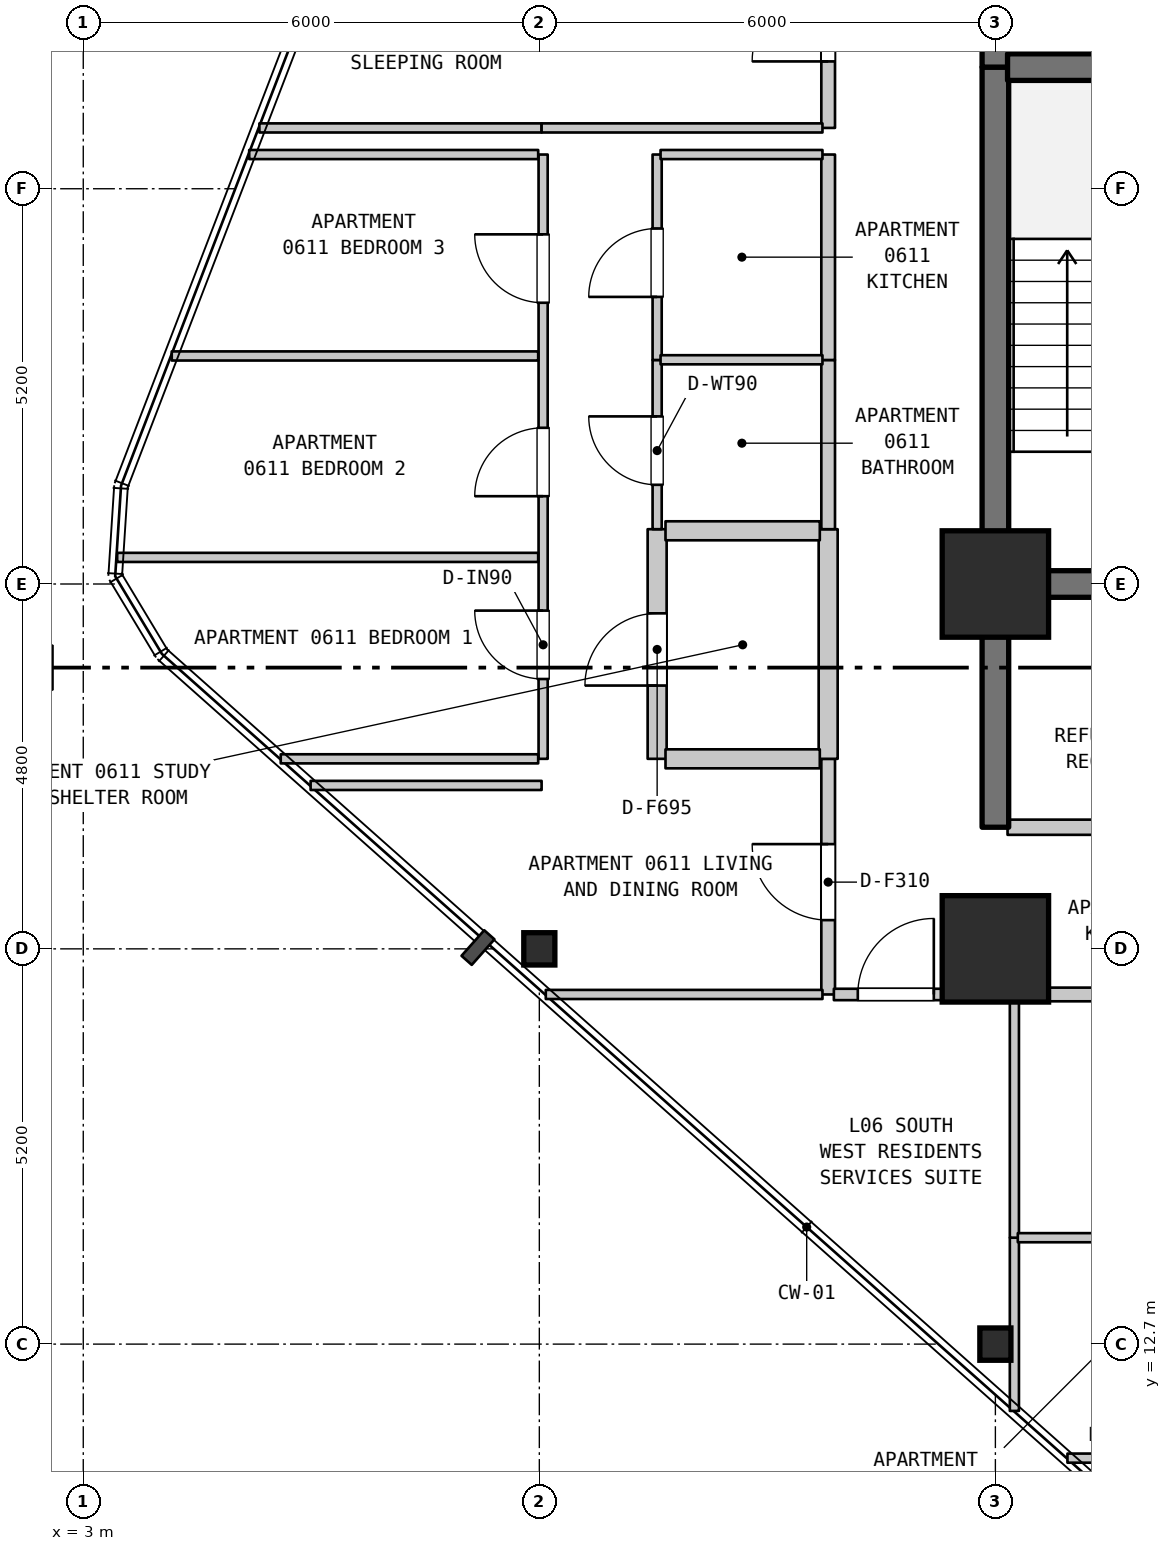
"""IFC4 building model, lengths in metres.
Left out: names, types, materials, properties, quantities, classifications, styles, units other than length and angle.
Written with IfcOpenShell. Run it as: python <this file> out.ifc"""

import sys

from ifc_helpers import new_model, si_unit, direction, frame, frame_2d, origin, origin_2d, place, context, subcontext, project, spatial, rectangle, i_section, extrude, element, fill, save


model = new_model("IFC4")
c1 = context("Model", 3, precision=1e-05, world=origin(), true_north=direction((0.0, 1.0)))
c2 = subcontext(c1, "Body", "Model", "MODEL_VIEW")
j1 = project(units=[si_unit("LENGTHUNIT", "METRE"), si_unit("PLANEANGLEUNIT", "RADIAN")], contexts=[c1])
p1 = place(None, origin())
s1 = spatial("IfcSite", under=j1, at=p1, CompositionType="ELEMENT")
p2 = place(p1, origin())
s2 = spatial("IfcBuilding", under=s1, at=p2, CompositionType="ELEMENT")
p3 = place(p2, frame((0.0, 0.0, 31.4)))
s3 = spatial("IfcBuildingStorey", under=s2, at=p3, CompositionType="ELEMENT", Elevation=31.4)
for number, where, z_axis, x_axis in (
    (1, (9.0, 17.9, 0.0), (0.0, 0.0, 1.0), (1.0, 0.0, 0.0)),
    (2, (15.0, 12.7, 0.0), (0.0, 0.0, 1.0), (1.0, 0.0, 0.0)),
):
    element("IfcColumn", number, at=place(p3, frame(where, z_axis=z_axis, x_axis=x_axis)), inside=s3, PredefinedType="COLUMN", context=c2, shape_type="SweptSolid", body=[
        extrude(i_section(OverallWidth=0.409, OverallDepth=0.425, WebThickness=0.032, FlangeThickness=0.052, FilletRadius=0.015, at=origin_2d()), origin(), (0.0, 0.0, 1.0), 3.7),
    ])
for number, where, z_axis, x_axis in (
    (3, (15.0, 17.9, 0.0), (0.0, 0.0, 1.0), (1.0, 0.0, 0.0)),
    (4, (15.0, 22.7, 0.0), (0.0, 0.0, 1.0), (1.0, 0.0, 0.0)),
):
    element("IfcColumn", number, at=place(p3, frame(where, z_axis=z_axis, x_axis=x_axis)), inside=s3, PredefinedType="COLUMN", context=c2, shape_type="SweptSolid", body=[
        extrude(rectangle(XDim=1.4, YDim=1.4, at=origin_2d()), origin(), (0.0, 0.0, 1.0), 3.7),
    ])
p4 = place(p3, frame((9.05, 20.4, 0.0), z_axis=(0.0, 0.0, 1.0), x_axis=(0.0, 1.0, 0.0)))
e5 = element("IfcWall", 5, at=p4, inside=s3, PredefinedType="PARTITIONING", context=c2, shape_type="SweptSolid", body=[
    extrude(rectangle(XDim=7.95, YDim=0.12, at=frame_2d((3.975, 0.0))), origin(), (0.0, 0.0, 1.0), 2.785),
])
p5 = place(p4, frame((1.05, 0.0, 0.0)))
e6 = element("IfcOpeningElement", 6, at=p5, cuts=e5, PredefinedType="OPENING", context=c2, shape_type="SweptSolid", body=[
    extrude(rectangle(XDim=0.9, YDim=2.15, at=frame_2d((0.45, 1.075))), frame((0.0, 0.07, 0.0), z_axis=(0.0, -1.0, 0.0), x_axis=(1.0, 0.0, 0.0)), (0.0, 0.0, 1.0), 0.14),
])
p6 = place(p4, frame((3.455, 0.0, 0.0)))
e7 = element("IfcOpeningElement", 7, at=p6, cuts=e5, PredefinedType="OPENING", context=c2, shape_type="SweptSolid", body=[
    extrude(rectangle(XDim=0.9, YDim=2.15, at=frame_2d((0.45, 1.075))), frame((0.0, 0.07, 0.0), z_axis=(0.0, -1.0, 0.0), x_axis=(1.0, 0.0, 0.0)), (0.0, 0.0, 1.0), 0.14),
])
p7 = place(p4, frame((6.0, 0.0, 0.0)))
e8 = element("IfcOpeningElement", 8, at=p7, cuts=e5, PredefinedType="OPENING", context=c2, shape_type="SweptSolid", body=[
    extrude(rectangle(XDim=0.9, YDim=2.15, at=frame_2d((0.45, 1.075))), frame((0.0, 0.07, 0.0), z_axis=(0.0, -1.0, 0.0), x_axis=(1.0, 0.0, 0.0)), (0.0, 0.0, 1.0), 0.14),
])
p8 = place(p3, frame((10.55, 20.4, 0.0), z_axis=(0.0, 0.0, 1.0), x_axis=(0.0, 1.0, 0.0)))
e9 = element("IfcWall", 9, at=p8, inside=s3, PredefinedType="STANDARD", context=c2, shape_type="SweptSolid", body=[
    extrude(rectangle(XDim=3.021, YDim=0.25, at=frame_2d((1.51, 0.0))), origin(), (0.0, 0.0, 1.0), 3.385),
])
p9 = place(p8, frame((0.964, 0.0, 0.0)))
e10 = element("IfcOpeningElement", 10, at=p9, cuts=e9, PredefinedType="OPENING", context=c2, shape_type="SweptSolid", body=[
    extrude(rectangle(XDim=0.95, YDim=2.15, at=frame_2d((0.475, 1.075))), frame((0.0, 0.135, 0.0), z_axis=(0.0, -1.0, 0.0), x_axis=(1.0, 0.0, 0.0)), (0.0, 0.0, 1.0), 0.27),
])
p10 = place(p3, frame((10.55, 23.421, 0.0), z_axis=(0.0, 0.0, 1.0), x_axis=(0.0, 1.0, 0.0)))
e11 = element("IfcWall", 11, at=p10, inside=s3, PredefinedType="PARTITIONING", context=c2, shape_type="SweptSolid", body=[
    extrude(rectangle(XDim=2.226, YDim=0.12, at=frame_2d((1.113, 0.0))), origin(), (0.0, 0.0, 1.0), 3.385),
])
p11 = place(p10, frame((0.584, 0.0, 0.0)))
e12 = element("IfcOpeningElement", 12, at=p11, cuts=e11, PredefinedType="OPENING", context=c2, shape_type="SweptSolid", body=[
    extrude(rectangle(XDim=0.9, YDim=2.1, at=frame_2d((0.45, 1.05))), frame((0.0, 0.07, 0.0), z_axis=(0.0, -1.0, 0.0), x_axis=(1.0, 0.0, 0.0)), (0.0, 0.0, 1.0), 0.14),
])
p12 = place(p3, frame((10.55, 25.647, 0.0), z_axis=(0.0, 0.0, 1.0), x_axis=(0.0, 1.0, 0.0)))
e13 = element("IfcWall", 13, at=p12, inside=s3, PredefinedType="PARTITIONING", context=c2, shape_type="SweptSolid", body=[
    extrude(rectangle(XDim=2.703, YDim=0.12, at=frame_2d((1.352, 0.0))), origin(), (0.0, 0.0, 1.0), 3.385),
])
p13 = place(p12, frame((0.83, 0.0, 0.0)))
e14 = element("IfcOpeningElement", 14, at=p13, cuts=e13, PredefinedType="OPENING", context=c2, shape_type="SweptSolid", body=[
    extrude(rectangle(XDim=0.9, YDim=2.15, at=frame_2d((0.45, 1.075))), frame((0.0, 0.07, 0.0), z_axis=(0.0, -1.0, 0.0), x_axis=(1.0, 0.0, 0.0)), (0.0, 0.0, 1.0), 0.14),
])
p14 = place(p3, frame((12.8, 17.3, 0.0), z_axis=(0.0, 0.0, 1.0), x_axis=(0.0, 1.0, 0.0)))
e15 = element("IfcWall", 15, at=p14, inside=s3, PredefinedType="STANDARD", context=c2, shape_type="SweptSolid", body=[
    extrude(rectangle(XDim=3.1, YDim=0.18, at=frame_2d((1.55, 0.0))), origin(), (0.0, 0.0, 1.0), 3.385),
])
p15 = place(p14, frame((0.978, 0.0, 0.0)))
e16 = element("IfcOpeningElement", 16, at=p15, cuts=e15, PredefinedType="OPENING", context=c2, shape_type="SweptSolid", body=[
    extrude(rectangle(XDim=1.0, YDim=2.15, at=frame_2d((0.5, 1.075))), frame((0.0, 0.1, 0.0), z_axis=(0.0, -1.0, 0.0), x_axis=(1.0, 0.0, 0.0)), (0.0, 0.0, 1.0), 0.2),
])
p16 = place(p3, frame((12.8, 20.4, 0.0), z_axis=(0.0, 0.0, 1.0), x_axis=(0.0, 1.0, 0.0)))
e17 = element("IfcWall", 17, at=p16, inside=s3, PredefinedType="STANDARD", context=c2, shape_type="SweptSolid", body=[
    extrude(rectangle(XDim=3.021, YDim=0.25, at=frame_2d((1.51, 0.0))), origin(), (0.0, 0.0, 1.0), 3.385),
])
p17 = place(p3, frame((12.8, 23.421, 0.0), z_axis=(0.0, 0.0, 1.0), x_axis=(0.0, 1.0, 0.0)))
e18 = element("IfcWall", 18, at=p17, inside=s3, PredefinedType="STANDARD", context=c2, shape_type="SweptSolid", body=[
    extrude(rectangle(XDim=2.226, YDim=0.18, at=frame_2d((1.113, 0.0))), origin(), (0.0, 0.0, 1.0), 3.385),
])
p18 = place(p3, frame((12.8, 25.647, 0.0), z_axis=(0.0, 0.0, 1.0), x_axis=(0.0, 1.0, 0.0)))
e19 = element("IfcWall", 19, at=p18, inside=s3, PredefinedType="STANDARD", context=c2, shape_type="SweptSolid", body=[
    extrude(rectangle(XDim=2.703, YDim=0.18, at=frame_2d((1.352, 0.0))), origin(), (0.0, 0.0, 1.0), 3.385),
])
p19 = place(p3, frame((12.8, 28.7, 0.0), z_axis=(0.0, 0.0, 1.0), x_axis=(0.0, 1.0, 0.0)))
e20 = element("IfcWall", 20, at=p19, inside=s3, PredefinedType="STANDARD", context=c2, shape_type="SweptSolid", body=[
    extrude(rectangle(XDim=2.75, YDim=0.18, at=frame_2d((1.375, 0.0))), origin(), (0.0, 0.0, 1.0), 3.385),
])
p20 = place(p19, frame((0.875, 0.0, 0.0)))
e21 = element("IfcOpeningElement", 21, at=p20, cuts=e20, PredefinedType="OPENING", context=c2, shape_type="SweptSolid", body=[
    extrude(rectangle(XDim=1.0, YDim=2.15, at=frame_2d((0.5, 1.075))), frame((0.0, 0.1, 0.0), z_axis=(0.0, -1.0, 0.0), x_axis=(1.0, 0.0, 0.0)), (0.0, 0.0, 1.0), 0.2),
])
p21 = place(p3, frame((15.0, 19.5, 0.0), z_axis=(0.0, 0.0, 1.0), x_axis=(0.0, 1.0, 0.0)))
e22 = element("IfcWall", 22, at=p21, inside=s3, PredefinedType="SHEAR", context=c2, shape_type="SweptSolid", body=[
    extrude(rectangle(XDim=3.2, YDim=0.35, at=frame_2d((1.6, 0.0))), origin(), (0.0, 0.0, 1.0), 3.385),
])
p22 = place(p3, frame((15.0, 22.7, 0.0), z_axis=(0.0, 0.0, 1.0), x_axis=(0.0, 1.0, 0.0)))
e23 = element("IfcWall", 23, at=p22, inside=s3, PredefinedType="SHEAR", context=c2, shape_type="SweptSolid", body=[
    extrude(rectangle(XDim=6.8, YDim=0.35, at=frame_2d((3.4, 0.0))), origin(), (0.0, 0.0, 1.0), 3.385),
])
p23 = place(p3, frame((15.0, 29.5, 0.0), z_axis=(0.0, 0.0, 1.0), x_axis=(0.0, 1.0, 0.0)))
e24 = element("IfcWall", 24, at=p23, inside=s3, PredefinedType="SHEAR", context=c2, shape_type="SweptSolid", body=[
    extrude(rectangle(XDim=1.6, YDim=0.35, at=frame_2d((0.8, 0.0))), origin(), (0.0, 0.0, 1.0), 3.385),
])
p24 = place(p23, frame((0.287, 0.0, 0.0)))
e25 = element("IfcOpeningElement", 25, at=p24, cuts=e24, PredefinedType="OPENING", context=c2, shape_type="SweptSolid", body=[
    extrude(rectangle(XDim=0.85, YDim=2.1, at=frame_2d((0.425, 1.05))), frame((0.0, 0.185, 0.0), z_axis=(0.0, -1.0, 0.0), x_axis=(1.0, 0.0, 0.0)), (0.0, 0.0, 1.0), 0.37),
])
p25 = place(p3, frame((15.25, 11.821, 0.0), z_axis=(0.0, 0.0, 1.0), x_axis=(0.0, 1.0, 0.0)))
e26 = element("IfcWall", 26, at=p25, inside=s3, PredefinedType="PARTITIONING", context=c2, shape_type="SweptSolid", body=[
    extrude(rectangle(XDim=2.279, YDim=0.12, at=frame_2d((1.14, 0.0))), origin(), (0.0, 0.0, 1.0), 3.385),
])
p26 = place(p3, frame((15.25, 14.1, 0.0), z_axis=(0.0, 0.0, 1.0), x_axis=(0.0, 1.0, 0.0)))
e27 = element("IfcWall", 27, at=p26, inside=s3, PredefinedType="PARTITIONING", context=c2, shape_type="SweptSolid", body=[
    extrude(rectangle(XDim=3.2, YDim=0.12, at=frame_2d((1.6, 0.0))), origin(), (0.0, 0.0, 1.0), 3.385),
])
p27 = place(p3, frame((15.948, 11.2, 0.0), z_axis=(0.0, 0.0, 1.0), x_axis=(1.0, 0.0, 0.0)))
e28 = element("IfcWall", 28, at=p27, inside=s3, PredefinedType="PARTITIONING", context=c2, shape_type="SweptSolid", body=[
    extrude(rectangle(XDim=1.607, YDim=0.12, at=frame_2d((0.803, 0.0))), origin(), (0.0, 0.0, 1.0), 3.385),
])
p28 = place(p3, frame((15.295, 14.1, 0.0), z_axis=(0.0, 0.0, 1.0), x_axis=(1.0, 0.0, 0.0)))
e29 = element("IfcWall", 29, at=p28, inside=s3, PredefinedType="PARTITIONING", context=c2, shape_type="SweptSolid", body=[
    extrude(rectangle(XDim=2.26, YDim=0.12, at=frame_2d((1.13, 0.0))), origin(), (0.0, 0.0, 1.0), 3.385),
])
p29 = place(p3, frame((9.085, 17.3, 0.0), z_axis=(0.0, 0.0, 1.0), x_axis=(1.0, 0.0, 0.0)))
e30 = element("IfcWall", 30, at=p29, inside=s3, PredefinedType="PARTITIONING", context=c2, shape_type="SweptSolid", body=[
    extrude(rectangle(XDim=3.64, YDim=0.12, at=frame_2d((1.82, 0.0))), origin(), (0.0, 0.0, 1.0), 3.385),
])
p30 = place(p3, frame((12.875, 17.3, 0.0), z_axis=(0.0, 0.0, 1.0), x_axis=(1.0, 0.0, 0.0)))
e31 = element("IfcWall", 31, at=p30, inside=s3, PredefinedType="STANDARD", context=c2, shape_type="SweptSolid", body=[
    extrude(rectangle(XDim=2.33, YDim=0.15, at=frame_2d((1.165, 0.0))), origin(), (0.0, 0.0, 1.0), 3.385),
])
p31 = place(p30, frame((0.315, 0.0, 0.0)))
e32 = element("IfcOpeningElement", 32, at=p31, cuts=e31, PredefinedType="OPENING", context=c2, shape_type="SweptSolid", body=[
    extrude(rectangle(XDim=1.0, YDim=2.15, at=frame_2d((0.5, 1.075))), frame((0.0, 0.085, 0.0), z_axis=(0.0, -1.0, 0.0), x_axis=(1.0, 0.0, 0.0)), (0.0, 0.0, 1.0), 0.17),
])
p32 = place(p3, frame((15.295, 17.3, 0.0), z_axis=(0.0, 0.0, 1.0), x_axis=(1.0, 0.0, 0.0)))
e33 = element("IfcWall", 33, at=p32, inside=s3, PredefinedType="STANDARD", context=c2, shape_type="SweptSolid", body=[
    extrude(rectangle(XDim=2.26, YDim=0.18, at=frame_2d((1.13, 0.0))), origin(), (0.0, 0.0, 1.0), 3.385),
])
p33 = place(p3, frame((15.16, 19.5, 0.0), z_axis=(0.0, 0.0, 1.0), x_axis=(1.0, 0.0, 0.0)))
e34 = element("IfcWall", 34, at=p33, inside=s3, PredefinedType="STANDARD", context=c2, shape_type="SweptSolid", body=[
    extrude(rectangle(XDim=3.68, YDim=0.2, at=frame_2d((1.84, 0.0))), origin(), (0.0, 0.0, 1.0), 3.385),
])
p34 = place(p33, frame((1.39, 0.0, 0.0)))
e35 = element("IfcOpeningElement", 35, at=p34, cuts=e34, PredefinedType="OPENING", context=c2, shape_type="SweptSolid", body=[
    extrude(rectangle(XDim=0.9, YDim=2.15, at=frame_2d((0.45, 1.075))), frame((0.0, 0.11, 0.0), z_axis=(0.0, -1.0, 0.0), x_axis=(1.0, 0.0, 0.0)), (0.0, 0.0, 1.0), 0.22),
])
p35 = place(p3, frame((5.991, 20.05, 0.0), z_axis=(0.0, 0.0, 1.0), x_axis=(1.0, 0.0, 0.0)))
e36 = element("IfcWall", 36, at=p35, inside=s3, PredefinedType="PARTITIONING", context=c2, shape_type="SweptSolid", body=[
    extrude(rectangle(XDim=3.039, YDim=0.12, at=frame_2d((1.52, 0.0))), origin(), (0.0, 0.0, 1.0), 3.385),
])
p36 = place(p3, frame((5.598, 20.4, 0.0), z_axis=(0.0, 0.0, 1.0), x_axis=(1.0, 0.0, 0.0)))
e37 = element("IfcWall", 37, at=p36, inside=s3, PredefinedType="PARTITIONING", context=c2, shape_type="SweptSolid", body=[
    extrude(rectangle(XDim=3.387, YDim=0.12, at=frame_2d((1.694, 0.0))), origin(), (0.0, 0.0, 1.0), 3.385),
])
p37 = place(p3, frame((10.66, 20.4, 0.0), z_axis=(0.0, 0.0, 1.0), x_axis=(1.0, 0.0, 0.0)))
e38 = element("IfcWall", 38, at=p37, inside=s3, PredefinedType="STANDARD", context=c2, shape_type="SweptSolid", body=[
    extrude(rectangle(XDim=2.03, YDim=0.25, at=frame_2d((1.015, 0.0))), origin(), (0.0, 0.0, 1.0), 3.385),
])
p38 = place(p3, frame((15.16, 22.7, 0.0), z_axis=(0.0, 0.0, 1.0), x_axis=(1.0, 0.0, 0.0)))
e39 = element("IfcWall", 39, at=p38, inside=s3, PredefinedType="SHEAR", context=c2, shape_type="SweptSolid", body=[
    extrude(rectangle(XDim=3.68, YDim=0.35, at=frame_2d((1.84, 0.0))), origin(), (0.0, 0.0, 1.0), 3.385),
])
p39 = place(p3, frame((3.446, 23.05, 0.0), z_axis=(0.0, 0.0, 1.0), x_axis=(1.0, 0.0, 0.0)))
e40 = element("IfcWall", 40, at=p39, inside=s3, PredefinedType="PARTITIONING", context=c2, shape_type="SweptSolid", body=[
    extrude(rectangle(XDim=5.539, YDim=0.12, at=frame_2d((2.77, 0.0))), origin(), (0.0, 0.0, 1.0), 3.385),
])
p40 = place(p3, frame((10.66, 23.4, 0.0), z_axis=(0.0, 0.0, 1.0), x_axis=(1.0, 0.0, 0.0)))
e41 = element("IfcWall", 41, at=p40, inside=s3, PredefinedType="STANDARD", context=c2, shape_type="SweptSolid", body=[
    extrude(rectangle(XDim=2.03, YDim=0.25, at=frame_2d((1.015, 0.0))), origin(), (0.0, 0.0, 1.0), 3.385),
])
p41 = place(p3, frame((10.595, 25.65, 0.0), z_axis=(0.0, 0.0, 1.0), x_axis=(1.0, 0.0, 0.0)))
e42 = element("IfcWall", 42, at=p41, inside=s3, PredefinedType="PARTITIONING", context=c2, shape_type="SweptSolid", body=[
    extrude(rectangle(XDim=2.13, YDim=0.12, at=frame_2d((1.065, 0.0))), origin(), (0.0, 0.0, 1.0), 3.385),
])
p42 = place(p3, frame((4.164, 25.7, 0.0), z_axis=(0.0, 0.0, 1.0), x_axis=(1.0, 0.0, 0.0)))
e43 = element("IfcWall", 43, at=p42, inside=s3, PredefinedType="PARTITIONING", context=c2, shape_type="SweptSolid", body=[
    extrude(rectangle(XDim=4.821, YDim=0.12, at=frame_2d((2.411, 0.0))), origin(), (0.0, 0.0, 1.0), 3.385),
])
p43 = place(p3, frame((5.183, 28.35, 0.0), z_axis=(0.0, 0.0, 1.0), x_axis=(1.0, 0.0, 0.0)))
e44 = element("IfcWall", 44, at=p43, inside=s3, PredefinedType="PARTITIONING", context=c2, shape_type="SweptSolid", body=[
    extrude(rectangle(XDim=3.802, YDim=0.12, at=frame_2d((1.901, 0.0))), origin(), (0.0, 0.0, 1.0), 3.385),
])
p44 = place(p3, frame((10.595, 28.35, 0.0), z_axis=(0.0, 0.0, 1.0), x_axis=(1.0, 0.0, 0.0)))
e45 = element("IfcWall", 45, at=p44, inside=s3, PredefinedType="PARTITIONING", context=c2, shape_type="SweptSolid", body=[
    extrude(rectangle(XDim=2.13, YDim=0.12, at=frame_2d((1.065, 0.0))), origin(), (0.0, 0.0, 1.0), 3.385),
])
p45 = place(p3, frame((5.317, 28.7, 0.0), z_axis=(0.0, 0.0, 1.0), x_axis=(1.0, 0.0, 0.0)))
e46 = element("IfcWall", 46, at=p45, inside=s3, PredefinedType="PARTITIONING", context=c2, shape_type="SweptSolid", body=[
    extrude(rectangle(XDim=3.713, YDim=0.12, at=frame_2d((1.856, 0.0))), origin(), (0.0, 0.0, 1.0), 3.385),
])
p46 = place(p3, frame((9.03, 28.7, 0.0), z_axis=(0.0, 0.0, 1.0), x_axis=(1.0, 0.0, 0.0)))
e47 = element("IfcWall", 47, at=p46, inside=s3, PredefinedType="PARTITIONING", context=c2, shape_type="SweptSolid", body=[
    extrude(rectangle(XDim=3.695, YDim=0.12, at=frame_2d((1.848, 0.0))), origin(), (0.0, 0.0, 1.0), 3.385),
])
p47 = place(p3, frame((15.16, 29.5, 0.0), z_axis=(0.0, 0.0, 1.0), x_axis=(1.0, 0.0, 0.0)))
e48 = element("IfcWall", 48, at=p47, inside=s3, PredefinedType="SHEAR", context=c2, shape_type="SweptSolid", body=[
    extrude(rectangle(XDim=3.68, YDim=0.35, at=frame_2d((1.84, 0.0))), origin(), (0.0, 0.0, 1.0), 3.385),
])
p48 = place(p5, origin())
e49 = element("IfcDoor", 49, at=p48, inside=s3, OperationType="SINGLE_SWING_RIGHT", PredefinedType="DOOR", context=c2, shape_type="SweptSolid", body=[
    extrude(rectangle(XDim=0.9, YDim=2.15, at=frame_2d((0.45, 1.075))), frame((0.0, 0.025, 0.0), z_axis=(0.0, -1.0, 0.0), x_axis=(1.0, 0.0, 0.0)), (0.0, 0.0, 1.0), 0.05),
])
fill(e6, e49)
p49 = place(p6, origin())
e50 = element("IfcDoor", 50, at=p49, inside=s3, OperationType="SINGLE_SWING_LEFT", PredefinedType="DOOR", context=c2, shape_type="SweptSolid", body=[
    extrude(rectangle(XDim=0.9, YDim=2.15, at=frame_2d((0.45, 1.075))), frame((0.0, 0.025, 0.0), z_axis=(0.0, -1.0, 0.0), x_axis=(1.0, 0.0, 0.0)), (0.0, 0.0, 1.0), 0.05),
])
fill(e7, e50)
p50 = place(p7, origin())
e51 = element("IfcDoor", 51, at=p50, inside=s3, OperationType="SINGLE_SWING_RIGHT", PredefinedType="DOOR", context=c2, shape_type="SweptSolid", body=[
    extrude(rectangle(XDim=0.9, YDim=2.15, at=frame_2d((0.45, 1.075))), frame((0.0, 0.025, 0.0), z_axis=(0.0, -1.0, 0.0), x_axis=(1.0, 0.0, 0.0)), (0.0, 0.0, 1.0), 0.05),
])
fill(e8, e51)
p51 = place(p9, origin())
e52 = element("IfcDoor", 52, at=p51, inside=s3, OperationType="SINGLE_SWING_LEFT", PredefinedType="DOOR", context=c2, shape_type="SweptSolid", body=[
    extrude(rectangle(XDim=0.95, YDim=2.15, at=frame_2d((0.475, 1.075))), frame((0.0, 0.025, 0.0), z_axis=(0.0, -1.0, 0.0), x_axis=(1.0, 0.0, 0.0)), (0.0, 0.0, 1.0), 0.05),
])
fill(e10, e52)
p52 = place(p11, origin())
e53 = element("IfcDoor", 53, at=p52, inside=s3, OperationType="SINGLE_SWING_RIGHT", PredefinedType="DOOR", context=c2, shape_type="SweptSolid", body=[
    extrude(rectangle(XDim=0.9, YDim=2.1, at=frame_2d((0.45, 1.05))), frame((0.0, 0.025, 0.0), z_axis=(0.0, -1.0, 0.0), x_axis=(1.0, 0.0, 0.0)), (0.0, 0.0, 1.0), 0.05),
])
fill(e12, e53)
p53 = place(p13, origin())
e54 = element("IfcDoor", 54, at=p53, inside=s3, OperationType="SINGLE_SWING_LEFT", PredefinedType="DOOR", context=c2, shape_type="SweptSolid", body=[
    extrude(rectangle(XDim=0.9, YDim=2.15, at=frame_2d((0.45, 1.075))), frame((0.0, 0.025, 0.0), z_axis=(0.0, -1.0, 0.0), x_axis=(1.0, 0.0, 0.0)), (0.0, 0.0, 1.0), 0.05),
])
fill(e14, e54)
p54 = place(p15, origin())
e55 = element("IfcDoor", 55, at=p54, inside=s3, OperationType="SINGLE_SWING_RIGHT", PredefinedType="DOOR", context=c2, shape_type="SweptSolid", body=[
    extrude(rectangle(XDim=1.0, YDim=2.15, at=frame_2d((0.5, 1.075))), frame((0.0, 0.025, 0.0), z_axis=(0.0, -1.0, 0.0), x_axis=(1.0, 0.0, 0.0)), (0.0, 0.0, 1.0), 0.05),
])
fill(e16, e55)
p55 = place(p20, origin())
e56 = element("IfcDoor", 56, at=p55, inside=s3, OperationType="SINGLE_SWING_LEFT", PredefinedType="DOOR", context=c2, shape_type="SweptSolid", body=[
    extrude(rectangle(XDim=1.0, YDim=2.15, at=frame_2d((0.5, 1.075))), frame((0.0, 0.025, 0.0), z_axis=(0.0, -1.0, 0.0), x_axis=(1.0, 0.0, 0.0)), (0.0, 0.0, 1.0), 0.05),
])
fill(e21, e56)
p56 = place(p31, origin())
e57 = element("IfcDoor", 57, at=p56, inside=s3, OperationType="SINGLE_SWING_RIGHT", PredefinedType="DOOR", context=c2, shape_type="SweptSolid", body=[
    extrude(rectangle(XDim=1.0, YDim=2.15, at=frame_2d((0.5, 1.075))), frame((0.0, 0.025, 0.0), z_axis=(0.0, -1.0, 0.0), x_axis=(1.0, 0.0, 0.0)), (0.0, 0.0, 1.0), 0.05),
])
fill(e32, e57)
save(model, sys.argv[1])
